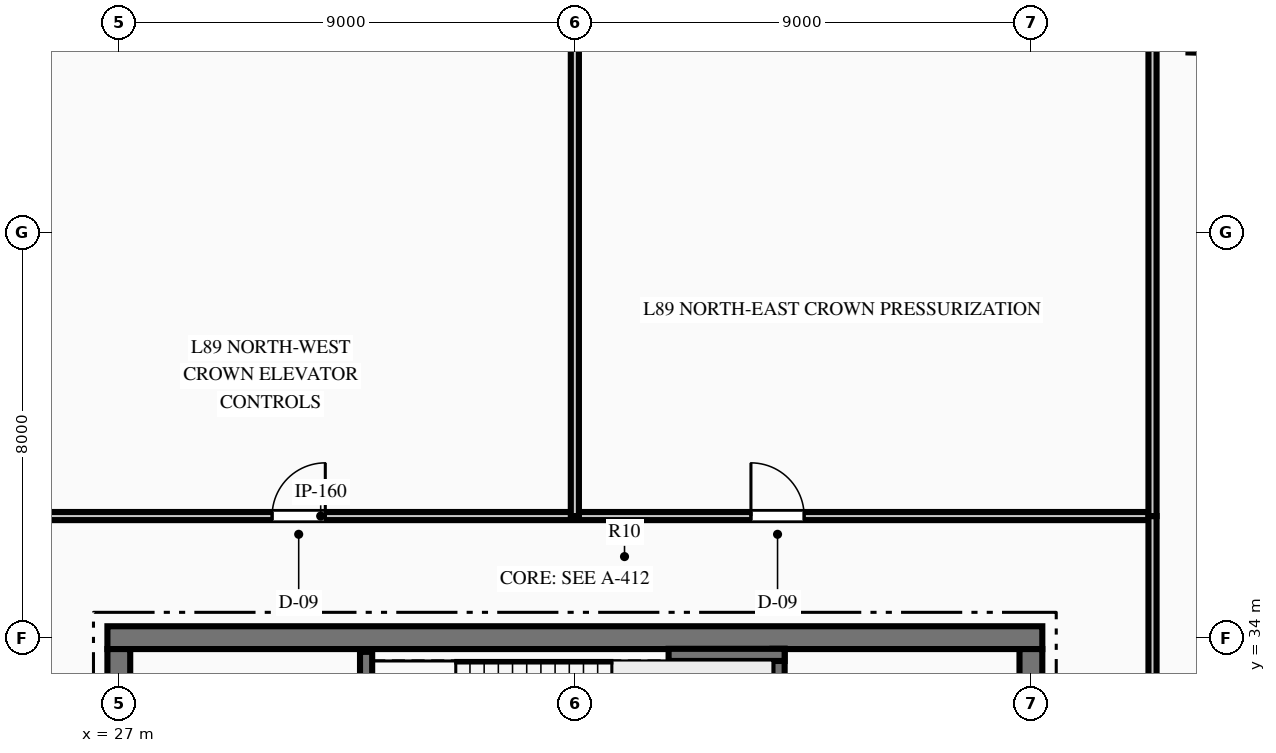
"""IFC4 building model, lengths in metres.
Left out: names, types, materials, properties, quantities, classifications, styles, units other than length and angle.
Written with IfcOpenShell. Run it as: python <this file> out.ifc"""

import sys

from ifc_helpers import new_model, si_unit, direction, frame, frame_2d, origin, origin_2d, place, context, subcontext, project, spatial, rectangle, i_section, extrude, element, fill, save


model = new_model("IFC4")
c1 = context("Model", 3, precision=1e-05, world=origin(), true_north=direction((0.0, 1.0)))
c2 = subcontext(c1, "Body", "Model", "MODEL_VIEW")
j1 = project(units=[si_unit("LENGTHUNIT", "METRE"), si_unit("PLANEANGLEUNIT", "RADIAN")], contexts=[c1])
p1 = place(None, origin())
s1 = spatial("IfcSite", under=j1, at=p1, CompositionType="ELEMENT")
p2 = place(p1, origin())
s2 = spatial("IfcBuilding", under=s1, at=p2, CompositionType="ELEMENT")
p3 = place(p2, frame((0.0, 0.0, 352.2)))
s3 = spatial("IfcBuildingStorey", under=s2, at=p3, CompositionType="ELEMENT", Elevation=352.2)
p4 = place(p3, frame((26.775, 34.0, 0.0), z_axis=(0.0, 0.0, 1.0), x_axis=(1.0, 0.0, 0.0)))
e1 = element("IfcWall", 1, at=p4, inside=s3, PredefinedType="SHEAR", context=c2, shape_type="SweptSolid", body=[
    extrude(rectangle(XDim=18.45, YDim=0.45, at=frame_2d((9.225, 0.0))), origin(), (0.0, 0.0, 1.0), 4.2),
])
p5 = place(p3, frame((27.0, 18.225, 0.0), z_axis=(0.0, 0.0, 1.0), x_axis=(0.0, 1.0, 0.0)))
e2 = element("IfcWall", 2, at=p5, inside=s3, PredefinedType="SHEAR", context=c2, shape_type="SweptSolid", body=[
    extrude(rectangle(XDim=15.55, YDim=0.45, at=frame_2d((7.775, 0.0))), origin(), (0.0, 0.0, 1.0), 4.2),
])
p6 = place(p5, frame((10.015, 0.0, 0.0)))
e3 = element("IfcOpeningElement", 3, at=p6, cuts=e2, PredefinedType="OPENING", context=c2, shape_type="SweptSolid", body=[
    extrude(rectangle(XDim=1.4, YDim=2.2, at=frame_2d((0.7, 1.1))), frame((0.0, 0.235, 0.0), z_axis=(0.0, -1.0, 0.0), x_axis=(1.0, 0.0, 0.0)), (0.0, 0.0, 1.0), 0.47),
])
p7 = place(p3, frame((45.0, 18.225, 0.0), z_axis=(0.0, 0.0, 1.0), x_axis=(0.0, 1.0, 0.0)))
e4 = element("IfcWall", 4, at=p7, inside=s3, PredefinedType="SHEAR", context=c2, shape_type="SweptSolid", body=[
    extrude(rectangle(XDim=15.55, YDim=0.45, at=frame_2d((7.775, 0.0))), origin(), (0.0, 0.0, 1.0), 4.2),
])
p8 = place(p7, frame((10.015, 0.0, 0.0)))
e5 = element("IfcOpeningElement", 5, at=p8, cuts=e4, PredefinedType="OPENING", context=c2, shape_type="SweptSolid", body=[
    extrude(rectangle(XDim=1.4, YDim=2.2, at=frame_2d((0.7, 1.1))), frame((0.0, 0.235, 0.0), z_axis=(0.0, -1.0, 0.0), x_axis=(1.0, 0.0, 0.0)), (0.0, 0.0, 1.0), 0.47),
])
p9 = place(p3, frame((31.88, 29.93, 0.0), z_axis=(0.0, 0.0, 1.0), x_axis=(0.0, 1.0, 0.0)))
e6 = element("IfcWall", 6, at=p9, inside=s3, PredefinedType="SHEAR", context=c2, shape_type="SweptSolid", body=[
    extrude(rectangle(XDim=3.79, YDim=0.24, at=frame_2d((1.895, 0.0))), origin(), (0.0, 0.0, 1.0), 4.2),
])
p10 = place(p3, frame((40.02, 29.93, 0.0), z_axis=(0.0, 0.0, 1.0), x_axis=(0.0, 1.0, 0.0)))
e7 = element("IfcWall", 7, at=p10, inside=s3, PredefinedType="SHEAR", context=c2, shape_type="SweptSolid", body=[
    extrude(rectangle(XDim=3.85, YDim=0.24, at=frame_2d((1.925, 0.0))), origin(), (0.0, 0.0, 1.0), 4.2),
])
p11 = place(p3, frame((37.85, 33.66, 0.0), z_axis=(0.0, 0.0, 1.0), x_axis=(1.0, 0.0, 0.0)))
e8 = element("IfcWall", 8, at=p11, inside=s3, PredefinedType="SHEAR", context=c2, shape_type="SweptSolid", body=[
    extrude(rectangle(XDim=2.29, YDim=0.24, at=frame_2d((1.145, 0.0))), origin(), (0.0, 0.0, 1.0), 4.2),
])
p12 = place(p3, frame((48.312, 45.745, 0.0), z_axis=(0.0, 0.0, 1.0), x_axis=(0.025304572866, 0.999679788028, 0.0)))
e9 = element("IfcColumn", 9, at=p12, inside=s3, PredefinedType="COLUMN", context=c2, shape_type="SweptSolid", body=[
    extrude(i_section(OverallWidth=0.4, OverallDepth=0.393, WebThickness=0.023, FlangeThickness=0.037, at=origin_2d()), origin(), (0.0, 0.0, 1.0), 4.2),
])
p13 = place(p3, frame((24.6, 36.4, 0.0), z_axis=(0.0, 0.0, 1.0), x_axis=(1.0, 0.0, 0.0)))
e10 = element("IfcWall", 10, at=p13, inside=s3, PredefinedType="PARTITIONING", context=c2, shape_type="SweptSolid", body=[
    extrude(rectangle(XDim=22.8, YDim=0.16, at=frame_2d((11.4, 0.0))), origin(), (0.0, 0.0, 1.0), 3.8),
])
p14 = place(p13, frame((5.425, 0.0, 0.0)))
e11 = element("IfcOpeningElement", 11, at=p14, cuts=e10, PredefinedType="OPENING", context=c2, shape_type="SweptSolid", body=[
    extrude(rectangle(XDim=1.05, YDim=2.15, at=frame_2d((0.525, 1.075))), frame((0.0, 0.09, 0.0), z_axis=(0.0, -1.0, 0.0), x_axis=(1.0, 0.0, 0.0)), (0.0, 0.0, 1.0), 0.18),
])
p15 = place(p13, frame((14.875, 0.0, 0.0)))
e12 = element("IfcOpeningElement", 12, at=p15, cuts=e10, PredefinedType="OPENING", context=c2, shape_type="SweptSolid", body=[
    extrude(rectangle(XDim=1.05, YDim=2.15, at=frame_2d((0.525, 1.075))), frame((0.0, 0.09, 0.0), z_axis=(0.0, -1.0, 0.0), x_axis=(1.0, 0.0, 0.0)), (0.0, 0.0, 1.0), 0.18),
])
p16 = place(p3, frame((47.4, 15.6, 0.0), z_axis=(0.0, 0.0, 1.0), x_axis=(0.0, 1.0, 0.0)))
e13 = element("IfcWall", 13, at=p16, inside=s3, PredefinedType="PARTITIONING", context=c2, shape_type="SweptSolid", body=[
    extrude(rectangle(XDim=20.8, YDim=0.16, at=frame_2d((10.4, 0.0))), origin(), (0.0, 0.0, 1.0), 3.8),
])
p17 = place(p16, frame((7.375, 0.0, 0.0)))
e14 = element("IfcOpeningElement", 14, at=p17, cuts=e13, PredefinedType="OPENING", context=c2, shape_type="SweptSolid", body=[
    extrude(rectangle(XDim=1.05, YDim=2.15, at=frame_2d((0.525, 1.075))), frame((0.0, 0.09, 0.0), z_axis=(0.0, -1.0, 0.0), x_axis=(1.0, 0.0, 0.0)), (0.0, 0.0, 1.0), 0.18),
])
p18 = place(p3, frame((36.0, 36.4, 0.0), z_axis=(0.0, 0.0, 1.0), x_axis=(0.0, 1.0, 0.0)))
e15 = element("IfcWall", 15, at=p18, inside=s3, PredefinedType="PARTITIONING", context=c2, shape_type="SweptSolid", body=[
    extrude(rectangle(XDim=11.958, YDim=0.16, at=frame_2d((5.979, 0.0))), origin(), (0.0, 0.0, 1.0), 3.8),
])
p19 = place(p3, frame((47.4, 36.4, 0.0), z_axis=(0.0, 0.0, 1.0), x_axis=(0.0, 1.0, 0.0)))
e16 = element("IfcWall", 16, at=p19, inside=s3, PredefinedType="PARTITIONING", context=c2, shape_type="SweptSolid", body=[
    extrude(rectangle(XDim=13.277, YDim=0.16, at=frame_2d((6.639, 0.0))), origin(), (0.0, 0.0, 1.0), 3.8),
])
p20 = place(p14, origin())
e17 = element("IfcDoor", 17, at=p20, inside=s3, OperationType="SINGLE_SWING_RIGHT", PredefinedType="DOOR", context=c2, shape_type="SweptSolid", body=[
    extrude(rectangle(XDim=1.05, YDim=2.15, at=frame_2d((0.525, 1.075))), frame((0.0, 0.025, 0.0), z_axis=(0.0, -1.0, 0.0), x_axis=(1.0, 0.0, 0.0)), (0.0, 0.0, 1.0), 0.05),
])
fill(e11, e17)
p21 = place(p15, origin())
e18 = element("IfcDoor", 18, at=p21, inside=s3, OperationType="SINGLE_SWING_LEFT", PredefinedType="DOOR", context=c2, shape_type="SweptSolid", body=[
    extrude(rectangle(XDim=1.05, YDim=2.15, at=frame_2d((0.525, 1.075))), frame((0.0, 0.025, 0.0), z_axis=(0.0, -1.0, 0.0), x_axis=(1.0, 0.0, 0.0)), (0.0, 0.0, 1.0), 0.05),
])
fill(e12, e18)
save(model, sys.argv[1])
